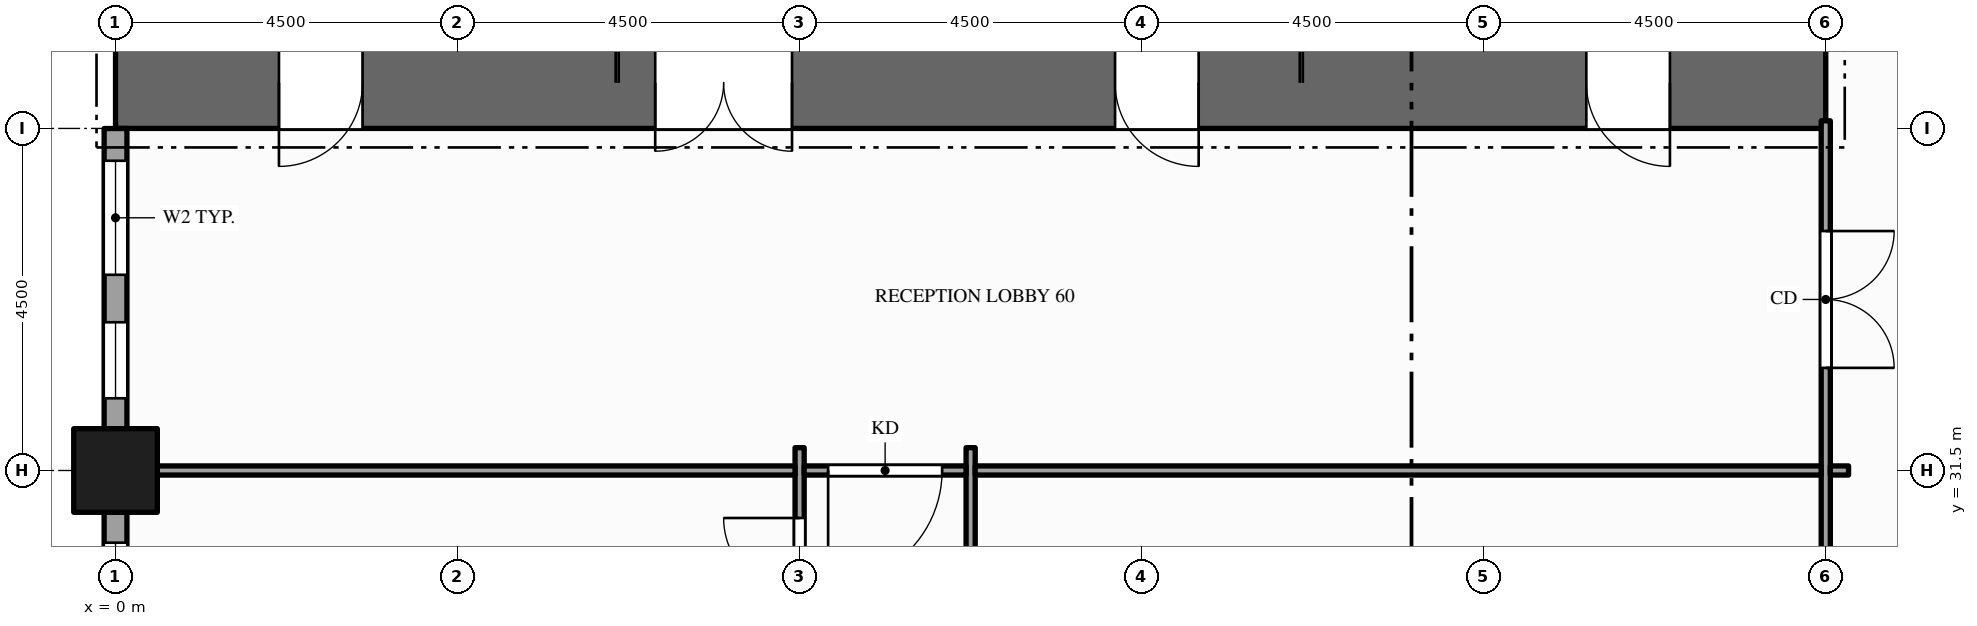
"""IFC4 building model, lengths in metres.
Left out: names, types, materials, properties, quantities, classifications, styles, units other than length and angle.
Written with IfcOpenShell. Run it as: python <this file> out.ifc"""

import sys

from ifc_helpers import new_model, si_unit, direction, frame, frame_2d, origin, origin_2d, place, context, subcontext, project, spatial, rectangle, hollow_rectangle, extrude, element, fill, save


model = new_model("IFC4")
c1 = context("Model", 3, precision=1e-05, world=origin(), true_north=direction((0.0, 1.0)))
c2 = subcontext(c1, "Body", "Model", "MODEL_VIEW")
j1 = project(units=[si_unit("LENGTHUNIT", "METRE"), si_unit("PLANEANGLEUNIT", "RADIAN")], contexts=[c1])
p1 = place(None, origin())
s1 = spatial("IfcSite", under=j1, at=p1, CompositionType="ELEMENT")
p2 = place(p1, origin())
s2 = spatial("IfcBuilding", under=s1, at=p2, CompositionType="ELEMENT")
p3 = place(p2, frame((0.0, 0.0, 8.0)))
s3 = spatial("IfcBuildingStorey", under=s2, at=p3, CompositionType="ELEMENT", Elevation=8.0)
p4 = place(p3, frame((0.0, 36.6, -0.15), z_axis=(0.0, 0.0, 1.0), x_axis=(1.0, 0.0, 0.0)))
e1 = element("IfcWall", 1, at=p4, inside=s3, PredefinedType="SHEAR", context=c2, shape_type="SweptSolid", body=[
    extrude(rectangle(XDim=22.5, YDim=1.2, at=frame_2d((11.25, 0.0))), origin(), (0.0, 0.0, 1.0), 6.0),
])
p5 = place(p4, frame((7.1, 0.0, 0.15)))
e2 = element("IfcOpeningElement", 2, at=p5, cuts=e1, PredefinedType="OPENING", context=c2, shape_type="SweptSolid", body=[
    extrude(rectangle(XDim=1.8, YDim=2.1, at=frame_2d((0.9, 1.05))), frame((0.0, 0.61, 0.0), z_axis=(0.0, -1.0, 0.0), x_axis=(1.0, 0.0, 0.0)), (0.0, 0.0, 1.0), 1.22),
])
p6 = place(p4, frame((13.15, 0.0, 0.15)))
e3 = element("IfcOpeningElement", 3, at=p6, cuts=e1, PredefinedType="OPENING", context=c2, shape_type="SweptSolid", body=[
    extrude(rectangle(XDim=1.1, YDim=2.1, at=frame_2d((0.55, 1.05))), frame((0.0, 0.61, 0.0), z_axis=(0.0, -1.0, 0.0), x_axis=(1.0, 0.0, 0.0)), (0.0, 0.0, 1.0), 1.22),
])
p7 = place(p4, frame((2.15, 0.0, 0.15)))
e4 = element("IfcOpeningElement", 4, at=p7, cuts=e1, PredefinedType="OPENING", context=c2, shape_type="SweptSolid", body=[
    extrude(rectangle(XDim=1.1, YDim=2.1, at=frame_2d((0.55, 1.05))), frame((0.0, 0.61, 0.0), z_axis=(0.0, -1.0, 0.0), x_axis=(1.0, 0.0, 0.0)), (0.0, 0.0, 1.0), 1.22),
])
p8 = place(p4, frame((19.35, 0.0, 0.15)))
e5 = element("IfcOpeningElement", 5, at=p8, cuts=e1, PredefinedType="OPENING", context=c2, shape_type="SweptSolid", body=[
    extrude(rectangle(XDim=1.1, YDim=2.1, at=frame_2d((0.55, 1.05))), frame((0.0, 0.61, 0.0), z_axis=(0.0, -1.0, 0.0), x_axis=(1.0, 0.0, 0.0)), (0.0, 0.0, 1.0), 1.22),
])
p9 = place(p3, frame((0.0, 31.5, -0.25), z_axis=(0.0, 0.0, 1.0), x_axis=(1.0, 0.0, 0.0)))
e6 = element("IfcColumn", 6, at=p9, inside=s3, PredefinedType="COLUMN", context=c2, shape_type="SweptSolid", body=[
    extrude(hollow_rectangle(XDim=1.1, YDim=1.1, WallThickness=0.06, at=origin_2d()), origin(), (0.0, 0.0, 1.0), 6.0),
])
p10 = place(p3, frame((0.0, 35.999, 0.0), z_axis=(0.0, 0.0, 1.0), x_axis=(0.0, -1.0, 0.0)))
e7 = element("IfcWall", 7, at=p10, inside=s3, PredefinedType="STANDARD", context=c2, shape_type="SweptSolid", body=[
    extrude(rectangle(XDim=3.949, YDim=0.3, at=frame_2d((1.975, 0.0))), origin(), (0.0, 0.0, 1.0), 5.036),
])
p11 = place(p10, frame((0.425, 0.0, 0.9)))
e8 = element("IfcOpeningElement", 8, at=p11, cuts=e7, PredefinedType="OPENING", context=c2, shape_type="SweptSolid", body=[
    extrude(rectangle(XDim=1.5, YDim=3.5, at=frame_2d((0.75, 1.75))), frame((0.0, 0.16, 0.0), z_axis=(0.0, -1.0, 0.0), x_axis=(1.0, 0.0, 0.0)), (0.0, 0.0, 1.0), 0.32),
])
p12 = place(p10, frame((2.549, 0.0, 0.9)))
e9 = element("IfcOpeningElement", 9, at=p12, cuts=e7, PredefinedType="OPENING", context=c2, shape_type="SweptSolid", body=[
    extrude(rectangle(XDim=1.0, YDim=3.5, at=frame_2d((0.5, 1.75))), frame((0.0, 0.16, 0.0), z_axis=(0.0, -1.0, 0.0), x_axis=(1.0, 0.0, 0.0)), (0.0, 0.0, 1.0), 0.32),
])
p13 = place(p3, frame((0.0, 30.95, 0.0), z_axis=(0.0, 0.0, 1.0), x_axis=(0.0, -1.0, 0.0)))
e10 = element("IfcWall", 10, at=p13, inside=s3, PredefinedType="STANDARD", context=c2, shape_type="SweptSolid", body=[
    extrude(rectangle(XDim=3.4, YDim=0.3, at=frame_2d((1.7, 0.0))), origin(), (0.0, 0.0, 1.0), 5.036),
])
p14 = place(p13, frame((0.4, 0.0, 0.9)))
e11 = element("IfcOpeningElement", 11, at=p14, cuts=e10, PredefinedType="OPENING", context=c2, shape_type="SweptSolid", body=[
    extrude(rectangle(XDim=1.0, YDim=3.5, at=frame_2d((0.5, 1.75))), frame((0.0, 0.16, 0.0), z_axis=(0.0, -1.0, 0.0), x_axis=(1.0, 0.0, 0.0)), (0.0, 0.0, 1.0), 0.32),
])
p15 = place(p13, frame((2.0, 0.0, 0.9)))
e12 = element("IfcOpeningElement", 12, at=p15, cuts=e10, PredefinedType="OPENING", context=c2, shape_type="SweptSolid", body=[
    extrude(rectangle(XDim=1.0, YDim=3.5, at=frame_2d((0.5, 1.75))), frame((0.0, 0.16, 0.0), z_axis=(0.0, -1.0, 0.0), x_axis=(1.0, 0.0, 0.0)), (0.0, 0.0, 1.0), 0.32),
])
p16 = place(p3, frame((9.0, 10.95, 0.0), z_axis=(0.0, 0.0, 1.0), x_axis=(0.0, 1.0, 0.0)))
e13 = element("IfcWall", 13, at=p16, inside=s3, PredefinedType="PARTITIONING", context=c2, shape_type="SweptSolid", body=[
    extrude(rectangle(XDim=20.85, YDim=0.12, at=frame_2d((10.425, 0.0))), origin(), (0.0, 0.0, 1.0), 4.5),
])
p17 = place(p16, frame((12.175, 0.0, 0.0)))
e14 = element("IfcOpeningElement", 14, at=p17, cuts=e13, PredefinedType="OPENING", context=c2, shape_type="SweptSolid", body=[
    extrude(rectangle(XDim=1.0, YDim=2.1, at=frame_2d((0.5, 1.05))), frame((0.0, 0.07, 0.0), z_axis=(0.0, -1.0, 0.0), x_axis=(1.0, 0.0, 0.0)), (0.0, 0.0, 1.0), 0.14),
])
p18 = place(p16, frame((15.55, 0.0, 0.0)))
e15 = element("IfcOpeningElement", 15, at=p18, cuts=e13, PredefinedType="OPENING", context=c2, shape_type="SweptSolid", body=[
    extrude(rectangle(XDim=1.0, YDim=2.1, at=frame_2d((0.5, 1.05))), frame((0.0, 0.07, 0.0), z_axis=(0.0, -1.0, 0.0), x_axis=(1.0, 0.0, 0.0)), (0.0, 0.0, 1.0), 0.14),
])
p19 = place(p16, frame((18.925, 0.0, 0.0)))
e16 = element("IfcOpeningElement", 16, at=p19, cuts=e13, PredefinedType="OPENING", context=c2, shape_type="SweptSolid", body=[
    extrude(rectangle(XDim=1.0, YDim=2.1, at=frame_2d((0.5, 1.05))), frame((0.0, 0.07, 0.0), z_axis=(0.0, -1.0, 0.0), x_axis=(1.0, 0.0, 0.0)), (0.0, 0.0, 1.0), 0.14),
])
p20 = place(p3, frame((11.25, 10.95, 0.0), z_axis=(0.0, 0.0, 1.0), x_axis=(0.0, 1.0, 0.0)))
e17 = element("IfcWall", 17, at=p20, inside=s3, PredefinedType="PARTITIONING", context=c2, shape_type="SweptSolid", body=[
    extrude(rectangle(XDim=20.85, YDim=0.12, at=frame_2d((10.425, 0.0))), origin(), (0.0, 0.0, 1.0), 4.5),
])
p21 = place(p20, frame((5.425, 0.0, 0.0)))
e18 = element("IfcOpeningElement", 18, at=p21, cuts=e17, PredefinedType="OPENING", context=c2, shape_type="SweptSolid", body=[
    extrude(rectangle(XDim=1.0, YDim=2.1, at=frame_2d((0.5, 1.05))), frame((0.0, 0.07, 0.0), z_axis=(0.0, -1.0, 0.0), x_axis=(1.0, 0.0, 0.0)), (0.0, 0.0, 1.0), 0.14),
])
p22 = place(p20, frame((13.3, 0.0, 0.0)))
e19 = element("IfcOpeningElement", 19, at=p22, cuts=e17, PredefinedType="OPENING", context=c2, shape_type="SweptSolid", body=[
    extrude(rectangle(XDim=1.0, YDim=2.1, at=frame_2d((0.5, 1.05))), frame((0.0, 0.07, 0.0), z_axis=(0.0, -1.0, 0.0), x_axis=(1.0, 0.0, 0.0)), (0.0, 0.0, 1.0), 0.14),
])
p23 = place(p20, frame((17.8, 0.0, 0.0)))
e20 = element("IfcOpeningElement", 20, at=p23, cuts=e17, PredefinedType="OPENING", context=c2, shape_type="SweptSolid", body=[
    extrude(rectangle(XDim=1.0, YDim=2.1, at=frame_2d((0.5, 1.05))), frame((0.0, 0.07, 0.0), z_axis=(0.0, -1.0, 0.0), x_axis=(1.0, 0.0, 0.0)), (0.0, 0.0, 1.0), 0.14),
])
p24 = place(p3, frame((22.5, 0.15, 0.0), z_axis=(0.0, 0.0, 1.0), x_axis=(0.0, 1.0, 0.0)))
e21 = element("IfcWall", 21, at=p24, inside=s3, PredefinedType="PARTITIONING", context=c2, shape_type="SweptSolid", body=[
    extrude(rectangle(XDim=35.95, YDim=0.12, at=frame_2d((17.975, 0.0))), origin(), (0.0, 0.0, 1.0), 4.759),
])
p25 = place(p24, frame((9.225, 0.0, 0.0)))
e22 = element("IfcOpeningElement", 22, at=p25, cuts=e21, PredefinedType="OPENING", context=c2, shape_type="SweptSolid", body=[
    extrude(rectangle(XDim=1.5, YDim=2.1, at=frame_2d((0.75, 1.05))), frame((0.0, 0.07, 0.0), z_axis=(0.0, -1.0, 0.0), x_axis=(1.0, 0.0, 0.0)), (0.0, 0.0, 1.0), 0.14),
])
p26 = place(p24, frame((32.7, 0.0, 0.0)))
e23 = element("IfcOpeningElement", 23, at=p26, cuts=e21, PredefinedType="OPENING", context=c2, shape_type="SweptSolid", body=[
    extrude(rectangle(XDim=1.8, YDim=2.1, at=frame_2d((0.9, 1.05))), frame((0.0, 0.07, 0.0), z_axis=(0.0, -1.0, 0.0), x_axis=(1.0, 0.0, 0.0)), (0.0, 0.0, 1.0), 0.14),
])
p27 = place(p3, frame((0.15, 31.5, 0.0), z_axis=(0.0, 0.0, 1.0), x_axis=(1.0, 0.0, 0.0)))
e24 = element("IfcWall", 24, at=p27, inside=s3, PredefinedType="PARTITIONING", context=c2, shape_type="SweptSolid", body=[
    extrude(rectangle(XDim=8.79, YDim=0.12, at=frame_2d((4.395, 0.0))), origin(), (0.0, 0.0, 1.0), 4.759),
])
p28 = place(p3, frame((9.06, 31.5, 0.0), z_axis=(0.0, 0.0, 1.0), x_axis=(1.0, 0.0, 0.0)))
e25 = element("IfcWall", 25, at=p28, inside=s3, PredefinedType="PARTITIONING", context=c2, shape_type="SweptSolid", body=[
    extrude(rectangle(XDim=2.13, YDim=0.12, at=frame_2d((1.065, 0.0))), origin(), (0.0, 0.0, 1.0), 4.759),
])
p29 = place(p28, frame((0.315, 0.0, 0.0)))
e26 = element("IfcOpeningElement", 26, at=p29, cuts=e25, PredefinedType="OPENING", context=c2, shape_type="SweptSolid", body=[
    extrude(rectangle(XDim=1.5, YDim=2.1, at=frame_2d((0.75, 1.05))), frame((0.0, 0.07, 0.0), z_axis=(0.0, -1.0, 0.0), x_axis=(1.0, 0.0, 0.0)), (0.0, 0.0, 1.0), 0.14),
])
p30 = place(p3, frame((11.31, 31.5, 0.0), z_axis=(0.0, 0.0, 1.0), x_axis=(1.0, 0.0, 0.0)))
e27 = element("IfcWall", 27, at=p30, inside=s3, PredefinedType="PARTITIONING", context=c2, shape_type="SweptSolid", body=[
    extrude(rectangle(XDim=11.13, YDim=0.12, at=frame_2d((5.565, 0.0))), origin(), (0.0, 0.0, 1.0), 4.5),
])
p31 = place(p3, frame((22.56, 31.5, 0.0), z_axis=(0.0, 0.0, 1.0), x_axis=(1.0, 0.0, 0.0)))
e28 = element("IfcWall", 28, at=p31, inside=s3, PredefinedType="PARTITIONING", context=c2, shape_type="SweptSolid", body=[
    extrude(rectangle(XDim=0.24, YDim=0.12, at=frame_2d((0.12, 0.0))), origin(), (0.0, 0.0, 1.0), 4.759),
])
p32 = place(p11, origin())
e29 = element("IfcWindow", 29, at=p32, inside=s3, PartitioningType="SINGLE_PANEL", PredefinedType="WINDOW", context=c2, shape_type="SweptSolid", body=[
    extrude(rectangle(XDim=1.5, YDim=3.5, at=frame_2d((0.75, 1.75))), frame((0.0, 0.03, 0.0), z_axis=(0.0, -1.0, 0.0), x_axis=(1.0, 0.0, 0.0)), (0.0, 0.0, 1.0), 0.06),
])
fill(e8, e29)
p33 = place(p12, origin())
e30 = element("IfcWindow", 30, at=p33, inside=s3, PartitioningType="SINGLE_PANEL", PredefinedType="WINDOW", context=c2, shape_type="SweptSolid", body=[
    extrude(rectangle(XDim=1.0, YDim=3.5, at=frame_2d((0.5, 1.75))), frame((0.0, 0.03, 0.0), z_axis=(0.0, -1.0, 0.0), x_axis=(1.0, 0.0, 0.0)), (0.0, 0.0, 1.0), 0.06),
])
fill(e9, e30)
p34 = place(p14, origin())
e31 = element("IfcWindow", 31, at=p34, inside=s3, PartitioningType="SINGLE_PANEL", PredefinedType="WINDOW", context=c2, shape_type="SweptSolid", body=[
    extrude(rectangle(XDim=1.0, YDim=3.5, at=frame_2d((0.5, 1.75))), frame((0.0, 0.03, 0.0), z_axis=(0.0, -1.0, 0.0), x_axis=(1.0, 0.0, 0.0)), (0.0, 0.0, 1.0), 0.06),
])
fill(e11, e31)
p35 = place(p5, origin())
e32 = element("IfcDoor", 32, at=p35, inside=s3, OperationType="DOUBLE_DOOR_SINGLE_SWING", PredefinedType="DOOR", context=c2, shape_type="SweptSolid", body=[
    extrude(rectangle(XDim=1.8, YDim=2.1, at=frame_2d((0.9, 1.05))), frame((0.0, 0.025, 0.0), z_axis=(0.0, -1.0, 0.0), x_axis=(1.0, 0.0, 0.0)), (0.0, 0.0, 1.0), 0.05),
])
fill(e2, e32)
p36 = place(p6, origin())
e33 = element("IfcDoor", 33, at=p36, inside=s3, OperationType="SINGLE_SWING_RIGHT", PredefinedType="DOOR", context=c2, shape_type="SweptSolid", body=[
    extrude(rectangle(XDim=1.1, YDim=2.1, at=frame_2d((0.55, 1.05))), frame((0.0, 0.025, 0.0), z_axis=(0.0, -1.0, 0.0), x_axis=(1.0, 0.0, 0.0)), (0.0, 0.0, 1.0), 0.05),
])
fill(e3, e33)
p37 = place(p7, origin())
e34 = element("IfcDoor", 34, at=p37, inside=s3, OperationType="SINGLE_SWING_LEFT", PredefinedType="DOOR", context=c2, shape_type="SweptSolid", body=[
    extrude(rectangle(XDim=1.1, YDim=2.1, at=frame_2d((0.55, 1.05))), frame((0.0, 0.025, 0.0), z_axis=(0.0, -1.0, 0.0), x_axis=(1.0, 0.0, 0.0)), (0.0, 0.0, 1.0), 0.05),
])
fill(e4, e34)
p38 = place(p8, origin())
e35 = element("IfcDoor", 35, at=p38, inside=s3, OperationType="SINGLE_SWING_RIGHT", PredefinedType="DOOR", context=c2, shape_type="SweptSolid", body=[
    extrude(rectangle(XDim=1.1, YDim=2.1, at=frame_2d((0.55, 1.05))), frame((0.0, 0.025, 0.0), z_axis=(0.0, -1.0, 0.0), x_axis=(1.0, 0.0, 0.0)), (0.0, 0.0, 1.0), 0.05),
])
fill(e5, e35)
p39 = place(p29, origin())
e36 = element("IfcDoor", 36, at=p39, inside=s3, OperationType="SINGLE_SWING_LEFT", PredefinedType="DOOR", context=c2, shape_type="SweptSolid", body=[
    extrude(rectangle(XDim=1.5, YDim=2.1, at=frame_2d((0.75, 1.05))), frame((0.0, 0.025, 0.0), z_axis=(0.0, -1.0, 0.0), x_axis=(1.0, 0.0, 0.0)), (0.0, 0.0, 1.0), 0.05),
])
fill(e26, e36)
p40 = place(p19, origin())
e37 = element("IfcDoor", 37, at=p40, inside=s3, OperationType="SINGLE_SWING_RIGHT", PredefinedType="DOOR", context=c2, shape_type="SweptSolid", body=[
    extrude(rectangle(XDim=1.0, YDim=2.1, at=frame_2d((0.5, 1.05))), frame((0.0, 0.025, 0.0), z_axis=(0.0, -1.0, 0.0), x_axis=(1.0, 0.0, 0.0)), (0.0, 0.0, 1.0), 0.05),
])
fill(e16, e37)
p41 = place(p26, origin())
e38 = element("IfcDoor", 38, at=p41, inside=s3, OperationType="DOUBLE_DOOR_SINGLE_SWING", PredefinedType="DOOR", context=c2, shape_type="SweptSolid", body=[
    extrude(rectangle(XDim=1.8, YDim=2.1, at=frame_2d((0.9, 1.05))), frame((0.0, 0.025, 0.0), z_axis=(0.0, -1.0, 0.0), x_axis=(1.0, 0.0, 0.0)), (0.0, 0.0, 1.0), 0.05),
])
fill(e23, e38)
save(model, sys.argv[1])
